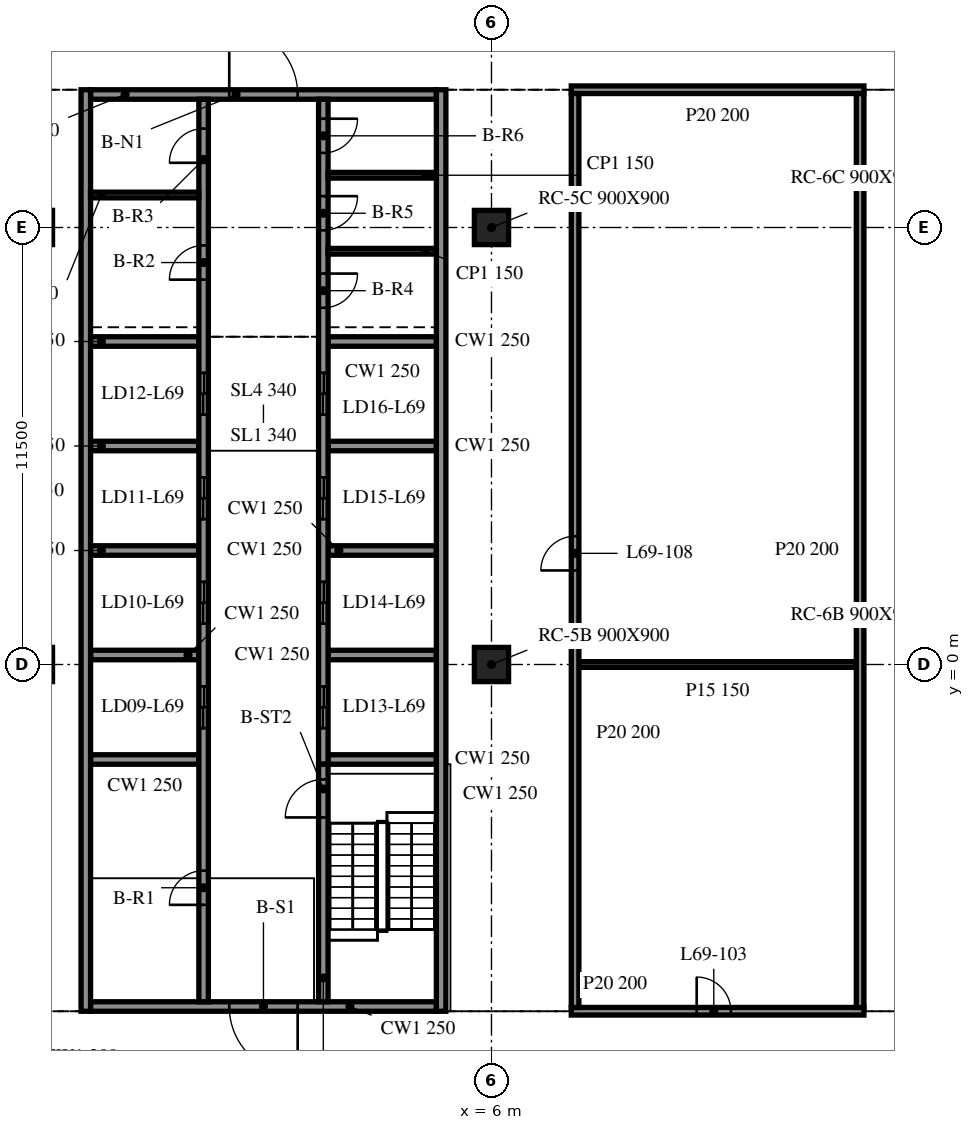
"""IFC4 building model, lengths in metres.
Left out: names, types, materials, properties, quantities, classifications, styles, units other than length and angle.
Written with IfcOpenShell. Run it as: python <this file> out.ifc"""

import sys

from ifc_helpers import new_model, si_unit, direction, frame, frame_2d, origin, origin_2d, place, context, subcontext, project, spatial, rectangle, extrude, element, fill, save


model = new_model("IFC4")
c1 = context("Model", 3, precision=1e-05, world=origin(), true_north=direction((0.0, 1.0)))
c2 = subcontext(c1, "Body", "Model", "MODEL_VIEW")
j1 = project(units=[si_unit("LENGTHUNIT", "METRE"), si_unit("PLANEANGLEUNIT", "RADIAN")], contexts=[c1])
p1 = place(None, origin())
s1 = spatial("IfcSite", under=j1, at=p1, CompositionType="ELEMENT")
p2 = place(p1, origin())
s2 = spatial("IfcBuilding", under=s1, at=p2, CompositionType="ELEMENT")
p3 = place(p2, frame((0.0, 0.0, 282.3)))
s3 = spatial("IfcBuildingStorey", under=s2, at=p3, CompositionType="ELEMENT", Elevation=282.3)
for number, where, z_axis, x_axis in (
    (1, (6.0, 0.0, -0.34), (0.0, 0.0, 1.0), (1.0, 0.0, 0.0)),
    (2, (6.0, 11.5, -0.34), (0.0, 0.0, 1.0), (1.0, 0.0, 0.0)),
):
    element("IfcColumn", number, at=place(p3, frame(where, z_axis=z_axis, x_axis=x_axis)), inside=s3, PredefinedType="COLUMN", context=c2, shape_type="SweptSolid", body=[
        extrude(rectangle(XDim=0.9, YDim=0.9, at=origin_2d()), origin(), (0.0, 0.0, 1.0), 7.34),
    ])
for number, where, z_axis, x_axis in (
    (3, (-4.675, 15.125, 0.0), (0.0, 0.0, 1.0), (0.0, -1.0, 0.0)),
    (4, (4.675, -9.125, 0.0), (0.0, 0.0, 1.0), (0.0, 1.0, 0.0)),
):
    element("IfcWall", number, at=place(p3, frame(where, z_axis=z_axis, x_axis=x_axis)), inside=s3, PredefinedType="SOLIDWALL", context=c2, shape_type="SweptSolid", body=[
        extrude(rectangle(XDim=24.25, YDim=0.25, at=frame_2d((12.125, 0.0))), origin(), (0.0, 0.0, 1.0), 3.46),
    ])
p4 = place(p3, frame((4.55, -9.0, 0.0), z_axis=(0.0, 0.0, 1.0), x_axis=(-1.0, 0.0, 0.0)))
e5 = element("IfcWall", 5, at=p4, inside=s3, PredefinedType="SOLIDWALL", context=c2, shape_type="SweptSolid", body=[
    extrude(rectangle(XDim=9.1, YDim=0.25, at=frame_2d((4.55, 0.0))), origin(), (0.0, 0.0, 1.0), 3.46),
])
p5 = place(p4, frame((3.65, 0.0, 0.0)))
e6 = element("IfcOpeningElement", 6, at=p5, cuts=e5, PredefinedType="OPENING", context=c2, shape_type="SweptSolid", body=[
    extrude(rectangle(XDim=1.8, YDim=2.1, at=frame_2d((0.9, 1.05))), frame((0.0, 0.135, 0.0), z_axis=(0.0, -1.0, 0.0), x_axis=(1.0, 0.0, 0.0)), (0.0, 0.0, 1.0), 0.27),
])
p6 = place(p3, frame((-4.55, 15.0, 0.0), z_axis=(0.0, 0.0, 1.0), x_axis=(1.0, 0.0, 0.0)))
e7 = element("IfcWall", 7, at=p6, inside=s3, PredefinedType="SOLIDWALL", context=c2, shape_type="SweptSolid", body=[
    extrude(rectangle(XDim=9.1, YDim=0.25, at=frame_2d((4.55, 0.0))), origin(), (0.0, 0.0, 1.0), 3.46),
])
p7 = place(p6, frame((3.65, 0.0, 0.0)))
e8 = element("IfcOpeningElement", 8, at=p7, cuts=e7, PredefinedType="OPENING", context=c2, shape_type="SweptSolid", body=[
    extrude(rectangle(XDim=1.8, YDim=2.1, at=frame_2d((0.9, 1.05))), frame((0.0, 0.135, 0.0), z_axis=(0.0, -1.0, 0.0), x_axis=(1.0, 0.0, 0.0)), (0.0, 0.0, 1.0), 0.27),
])
p8 = place(p3, frame((-1.575, -8.875, 0.0), z_axis=(0.0, 0.0, 1.0), x_axis=(0.0, 1.0, 0.0)))
e9 = element("IfcWall", 9, at=p8, inside=s3, PredefinedType="SOLIDWALL", context=c2, shape_type="SweptSolid", body=[
    extrude(rectangle(XDim=23.75, YDim=0.25, at=frame_2d((11.875, 0.0))), origin(), (0.0, 0.0, 1.0), 3.46),
])
p9 = place(p8, frame((7.2, 0.0, 0.0)))
e10 = element("IfcOpeningElement", 10, at=p9, cuts=e9, PredefinedType="OPENING", context=c2, shape_type="SweptSolid", body=[
    extrude(rectangle(XDim=1.1, YDim=2.1, at=frame_2d((0.55, 1.05))), frame((0.0, 0.135, 0.0), z_axis=(0.0, -1.0, 0.0), x_axis=(1.0, 0.0, 0.0)), (0.0, 0.0, 1.0), 0.27),
])
p10 = place(p8, frame((9.95, 0.0, 0.0)))
e11 = element("IfcOpeningElement", 11, at=p10, cuts=e9, PredefinedType="OPENING", context=c2, shape_type="SweptSolid", body=[
    extrude(rectangle(XDim=1.1, YDim=2.1, at=frame_2d((0.55, 1.05))), frame((0.0, 0.135, 0.0), z_axis=(0.0, -1.0, 0.0), x_axis=(1.0, 0.0, 0.0)), (0.0, 0.0, 1.0), 0.27),
])
p11 = place(p8, frame((12.7, 0.0, 0.0)))
e12 = element("IfcOpeningElement", 12, at=p11, cuts=e9, PredefinedType="OPENING", context=c2, shape_type="SweptSolid", body=[
    extrude(rectangle(XDim=1.1, YDim=2.1, at=frame_2d((0.55, 1.05))), frame((0.0, 0.135, 0.0), z_axis=(0.0, -1.0, 0.0), x_axis=(1.0, 0.0, 0.0)), (0.0, 0.0, 1.0), 0.27),
])
p12 = place(p8, frame((15.45, 0.0, 0.0)))
e13 = element("IfcOpeningElement", 13, at=p12, cuts=e9, PredefinedType="OPENING", context=c2, shape_type="SweptSolid", body=[
    extrude(rectangle(XDim=1.1, YDim=2.1, at=frame_2d((0.55, 1.05))), frame((0.0, 0.135, 0.0), z_axis=(0.0, -1.0, 0.0), x_axis=(1.0, 0.0, 0.0)), (0.0, 0.0, 1.0), 0.27),
])
p13 = place(p8, frame((2.55, 0.0, 0.0)))
e14 = element("IfcOpeningElement", 14, at=p13, cuts=e9, PredefinedType="OPENING", context=c2, shape_type="SweptSolid", body=[
    extrude(rectangle(XDim=0.9, YDim=2.1, at=frame_2d((0.45, 1.05))), frame((0.0, 0.135, 0.0), z_axis=(0.0, -1.0, 0.0), x_axis=(1.0, 0.0, 0.0)), (0.0, 0.0, 1.0), 0.27),
])
p14 = place(p8, frame((19.002, 0.0, 0.0)))
e15 = element("IfcOpeningElement", 15, at=p14, cuts=e9, PredefinedType="OPENING", context=c2, shape_type="SweptSolid", body=[
    extrude(rectangle(XDim=0.9, YDim=2.1, at=frame_2d((0.45, 1.05))), frame((0.0, 0.135, 0.0), z_axis=(0.0, -1.0, 0.0), x_axis=(1.0, 0.0, 0.0)), (0.0, 0.0, 1.0), 0.27),
])
p15 = place(p8, frame((22.077, 0.0, 0.0)))
e16 = element("IfcOpeningElement", 16, at=p15, cuts=e9, PredefinedType="OPENING", context=c2, shape_type="SweptSolid", body=[
    extrude(rectangle(XDim=0.9, YDim=2.1, at=frame_2d((0.45, 1.05))), frame((0.0, 0.135, 0.0), z_axis=(0.0, -1.0, 0.0), x_axis=(1.0, 0.0, 0.0)), (0.0, 0.0, 1.0), 0.27),
])
p16 = place(p3, frame((1.575, -8.875, 0.0), z_axis=(0.0, 0.0, 1.0), x_axis=(0.0, 1.0, 0.0)))
e17 = element("IfcWall", 17, at=p16, inside=s3, PredefinedType="SOLIDWALL", context=c2, shape_type="SweptSolid", body=[
    extrude(rectangle(XDim=6.25, YDim=0.25, at=frame_2d((3.125, 0.0))), origin(), (0.0, 0.0, 1.0), 3.46),
])
p17 = place(p16, frame((4.85, 0.0, 0.0)))
e18 = element("IfcOpeningElement", 18, at=p17, cuts=e17, PredefinedType="OPENING", context=c2, shape_type="SweptSolid", body=[
    extrude(rectangle(XDim=1.0, YDim=2.1, at=frame_2d((0.5, 1.05))), frame((0.0, 0.135, 0.0), z_axis=(0.0, -1.0, 0.0), x_axis=(1.0, 0.0, 0.0)), (0.0, 0.0, 1.0), 0.27),
])
p18 = place(p3, frame((1.575, 14.875, 0.0), z_axis=(0.0, 0.0, 1.0), x_axis=(0.0, -1.0, 0.0)))
e19 = element("IfcWall", 19, at=p18, inside=s3, PredefinedType="SOLIDWALL", context=c2, shape_type="SweptSolid", body=[
    extrude(rectangle(XDim=17.5, YDim=0.25, at=frame_2d((8.75, 0.0))), origin(), (0.0, 0.0, 1.0), 3.46),
])
p19 = place(p18, frame((15.45, 0.0, 0.0)))
e20 = element("IfcOpeningElement", 20, at=p19, cuts=e19, PredefinedType="OPENING", context=c2, shape_type="SweptSolid", body=[
    extrude(rectangle(XDim=1.1, YDim=2.1, at=frame_2d((0.55, 1.05))), frame((0.0, 0.135, 0.0), z_axis=(0.0, -1.0, 0.0), x_axis=(1.0, 0.0, 0.0)), (0.0, 0.0, 1.0), 0.27),
])
p20 = place(p18, frame((12.7, 0.0, 0.0)))
e21 = element("IfcOpeningElement", 21, at=p20, cuts=e19, PredefinedType="OPENING", context=c2, shape_type="SweptSolid", body=[
    extrude(rectangle(XDim=1.1, YDim=2.1, at=frame_2d((0.55, 1.05))), frame((0.0, 0.135, 0.0), z_axis=(0.0, -1.0, 0.0), x_axis=(1.0, 0.0, 0.0)), (0.0, 0.0, 1.0), 0.27),
])
p21 = place(p18, frame((9.95, 0.0, 0.0)))
e22 = element("IfcOpeningElement", 22, at=p21, cuts=e19, PredefinedType="OPENING", context=c2, shape_type="SweptSolid", body=[
    extrude(rectangle(XDim=1.1, YDim=2.1, at=frame_2d((0.55, 1.05))), frame((0.0, 0.135, 0.0), z_axis=(0.0, -1.0, 0.0), x_axis=(1.0, 0.0, 0.0)), (0.0, 0.0, 1.0), 0.27),
])
p22 = place(p18, frame((7.2, 0.0, 0.0)))
e23 = element("IfcOpeningElement", 23, at=p22, cuts=e19, PredefinedType="OPENING", context=c2, shape_type="SweptSolid", body=[
    extrude(rectangle(XDim=1.1, YDim=2.1, at=frame_2d((0.55, 1.05))), frame((0.0, 0.135, 0.0), z_axis=(0.0, -1.0, 0.0), x_axis=(1.0, 0.0, 0.0)), (0.0, 0.0, 1.0), 0.27),
])
p23 = place(p18, frame((4.587, 0.0, 0.0)))
e24 = element("IfcOpeningElement", 24, at=p23, cuts=e19, PredefinedType="OPENING", context=c2, shape_type="SweptSolid", body=[
    extrude(rectangle(XDim=0.9, YDim=2.1, at=frame_2d((0.45, 1.05))), frame((0.0, 0.135, 0.0), z_axis=(0.0, -1.0, 0.0), x_axis=(1.0, 0.0, 0.0)), (0.0, 0.0, 1.0), 0.27),
])
p24 = place(p18, frame((2.55, 0.0, 0.0)))
e25 = element("IfcOpeningElement", 25, at=p24, cuts=e19, PredefinedType="OPENING", context=c2, shape_type="SweptSolid", body=[
    extrude(rectangle(XDim=0.9, YDim=2.1, at=frame_2d((0.45, 1.05))), frame((0.0, 0.135, 0.0), z_axis=(0.0, -1.0, 0.0), x_axis=(1.0, 0.0, 0.0)), (0.0, 0.0, 1.0), 0.27),
])
p25 = place(p18, frame((0.512, 0.0, 0.0)))
e26 = element("IfcOpeningElement", 26, at=p25, cuts=e19, PredefinedType="OPENING", context=c2, shape_type="SweptSolid", body=[
    extrude(rectangle(XDim=0.9, YDim=2.1, at=frame_2d((0.45, 1.05))), frame((0.0, 0.135, 0.0), z_axis=(0.0, -1.0, 0.0), x_axis=(1.0, 0.0, 0.0)), (0.0, 0.0, 1.0), 0.27),
])
for number, where, z_axis, x_axis in (
    (27, (-4.55, -2.5, 0.0), (0.0, 0.0, 1.0), (1.0, 0.0, 0.0)),
    (28, (-4.55, 0.25, 0.0), (0.0, 0.0, 1.0), (1.0, 0.0, 0.0)),
    (29, (-4.55, 3.0, 0.0), (0.0, 0.0, 1.0), (1.0, 0.0, 0.0)),
    (30, (-4.55, 5.75, 0.0), (0.0, 0.0, 1.0), (1.0, 0.0, 0.0)),
    (31, (-4.55, 8.5, 0.0), (0.0, 0.0, 1.0), (1.0, 0.0, 0.0)),
    (32, (1.7, -2.5, 0.0), (0.0, 0.0, 1.0), (1.0, 0.0, 0.0)),
    (33, (1.7, 0.25, 0.0), (0.0, 0.0, 1.0), (1.0, 0.0, 0.0)),
    (34, (1.7, 3.0, 0.0), (0.0, 0.0, 1.0), (1.0, 0.0, 0.0)),
    (35, (1.7, 5.75, 0.0), (0.0, 0.0, 1.0), (1.0, 0.0, 0.0)),
    (36, (1.7, 8.5, 0.0), (0.0, 0.0, 1.0), (1.0, 0.0, 0.0)),
):
    element("IfcWall", number, at=place(p3, frame(where, z_axis=z_axis, x_axis=x_axis)), inside=s3, PredefinedType="SOLIDWALL", context=c2, shape_type="SweptSolid", body=[
        extrude(rectangle(XDim=2.85, YDim=0.25, at=frame_2d((1.425, 0.0))), origin(), (0.0, 0.0, 1.0), 3.46),
    ])
for number, where, z_axis, x_axis in (
    (37, (-4.55, 12.355, 0.0), (0.0, 0.0, 1.0), (1.0, 0.0, 0.0)),
    (38, (1.7, 10.875, 0.0), (0.0, 0.0, 1.0), (1.0, 0.0, 0.0)),
    (39, (1.7, 12.875, 0.0), (0.0, 0.0, 1.0), (1.0, 0.0, 0.0)),
):
    element("IfcWall", number, at=place(p3, frame(where, z_axis=z_axis, x_axis=x_axis)), inside=s3, PredefinedType="PARTITIONING", context=c2, shape_type="SweptSolid", body=[
        extrude(rectangle(XDim=2.85, YDim=0.15, at=frame_2d((1.425, 0.0))), origin(), (0.0, 0.0, 1.0), 3.46),
    ])
p26 = place(p3, frame((8.1, -9.125, 0.0), z_axis=(0.0, 0.0, 1.0), x_axis=(1.0, 0.0, 0.0)))
e40 = element("IfcWall", 40, at=p26, inside=s3, PredefinedType="PARTITIONING", context=c2, shape_type="SweptSolid", body=[
    extrude(rectangle(XDim=7.7, YDim=0.2, at=frame_2d((3.85, 0.0))), origin(), (0.0, 0.0, 1.0), 3.4),
])
p27 = place(p26, frame((3.3, 0.0, 0.0)))
e41 = element("IfcOpeningElement", 41, at=p27, cuts=e40, PredefinedType="OPENING", context=c2, shape_type="SweptSolid", body=[
    extrude(rectangle(XDim=0.9, YDim=2.1, at=frame_2d((0.45, 1.05))), frame((0.0, 0.11, 0.0), z_axis=(0.0, -1.0, 0.0), x_axis=(1.0, 0.0, 0.0)), (0.0, 0.0, 1.0), 0.22),
])
p28 = place(p3, frame((8.3, 0.0, 0.0), z_axis=(0.0, 0.0, 1.0), x_axis=(1.0, 0.0, 0.0)))
e42 = element("IfcWall", 42, at=p28, inside=s3, PredefinedType="PARTITIONING", context=c2, shape_type="SweptSolid", body=[
    extrude(rectangle(XDim=7.3, YDim=0.15, at=frame_2d((3.65, 0.0))), origin(), (0.0, 0.0, 1.0), 3.4),
])
p29 = place(p3, frame((8.1, 15.125, 0.0), z_axis=(0.0, 0.0, 1.0), x_axis=(1.0, 0.0, 0.0)))
e43 = element("IfcWall", 43, at=p29, inside=s3, PredefinedType="PARTITIONING", context=c2, shape_type="SweptSolid", body=[
    extrude(rectangle(XDim=7.7, YDim=0.2, at=frame_2d((3.85, 0.0))), origin(), (0.0, 0.0, 1.0), 3.4),
])
p30 = place(p3, frame((8.2, -9.025, 0.0), z_axis=(0.0, 0.0, 1.0), x_axis=(0.0, 1.0, 0.0)))
e44 = element("IfcWall", 44, at=p30, inside=s3, PredefinedType="PARTITIONING", context=c2, shape_type="SweptSolid", body=[
    extrude(rectangle(XDim=24.05, YDim=0.2, at=frame_2d((12.025, 0.0))), origin(), (0.0, 0.0, 1.0), 3.4),
])
p31 = place(p30, frame((11.5, 0.0, 0.0)))
e45 = element("IfcOpeningElement", 45, at=p31, cuts=e44, PredefinedType="OPENING", context=c2, shape_type="SweptSolid", body=[
    extrude(rectangle(XDim=0.9, YDim=2.1, at=frame_2d((0.45, 1.05))), frame((0.0, 0.11, 0.0), z_axis=(0.0, -1.0, 0.0), x_axis=(1.0, 0.0, 0.0)), (0.0, 0.0, 1.0), 0.22),
])
p32 = place(p3, frame((15.7, -9.025, 0.0), z_axis=(0.0, 0.0, 1.0), x_axis=(0.0, 1.0, 0.0)))
e46 = element("IfcWall", 46, at=p32, inside=s3, PredefinedType="PARTITIONING", context=c2, shape_type="SweptSolid", body=[
    extrude(rectangle(XDim=24.05, YDim=0.2, at=frame_2d((12.025, 0.0))), origin(), (0.0, 0.0, 1.0), 3.4),
])
p33 = place(p5, origin())
e47 = element("IfcDoor", 47, at=p33, inside=s3, OperationType="DOUBLE_DOOR_SINGLE_SWING", PredefinedType="DOOR", context=c2, shape_type="SweptSolid", body=[
    extrude(rectangle(XDim=1.8, YDim=2.1, at=frame_2d((0.9, 1.05))), frame((0.0, 0.025, 0.0), z_axis=(0.0, -1.0, 0.0), x_axis=(1.0, 0.0, 0.0)), (0.0, 0.0, 1.0), 0.05),
])
fill(e6, e47)
p34 = place(p7, origin())
e48 = element("IfcDoor", 48, at=p34, inside=s3, OperationType="DOUBLE_DOOR_SINGLE_SWING", PredefinedType="DOOR", context=c2, shape_type="SweptSolid", body=[
    extrude(rectangle(XDim=1.8, YDim=2.1, at=frame_2d((0.9, 1.05))), frame((0.0, 0.025, 0.0), z_axis=(0.0, -1.0, 0.0), x_axis=(1.0, 0.0, 0.0)), (0.0, 0.0, 1.0), 0.05),
])
fill(e8, e48)
p35 = place(p19, origin())
e49 = element("IfcDoor", 49, at=p35, inside=s3, OperationType="DOUBLE_DOOR_SLIDING", PredefinedType="DOOR", context=c2, shape_type="SweptSolid", body=[
    extrude(rectangle(XDim=1.1, YDim=2.1, at=frame_2d((0.55, 1.05))), frame((0.0, 0.025, 0.0), z_axis=(0.0, -1.0, 0.0), x_axis=(1.0, 0.0, 0.0)), (0.0, 0.0, 1.0), 0.05),
])
fill(e20, e49)
p36 = place(p20, origin())
e50 = element("IfcDoor", 50, at=p36, inside=s3, OperationType="DOUBLE_DOOR_SLIDING", PredefinedType="DOOR", context=c2, shape_type="SweptSolid", body=[
    extrude(rectangle(XDim=1.1, YDim=2.1, at=frame_2d((0.55, 1.05))), frame((0.0, 0.025, 0.0), z_axis=(0.0, -1.0, 0.0), x_axis=(1.0, 0.0, 0.0)), (0.0, 0.0, 1.0), 0.05),
])
fill(e21, e50)
p37 = place(p21, origin())
e51 = element("IfcDoor", 51, at=p37, inside=s3, OperationType="DOUBLE_DOOR_SLIDING", PredefinedType="DOOR", context=c2, shape_type="SweptSolid", body=[
    extrude(rectangle(XDim=1.1, YDim=2.1, at=frame_2d((0.55, 1.05))), frame((0.0, 0.025, 0.0), z_axis=(0.0, -1.0, 0.0), x_axis=(1.0, 0.0, 0.0)), (0.0, 0.0, 1.0), 0.05),
])
fill(e22, e51)
p38 = place(p22, origin())
e52 = element("IfcDoor", 52, at=p38, inside=s3, OperationType="DOUBLE_DOOR_SLIDING", PredefinedType="DOOR", context=c2, shape_type="SweptSolid", body=[
    extrude(rectangle(XDim=1.1, YDim=2.1, at=frame_2d((0.55, 1.05))), frame((0.0, 0.025, 0.0), z_axis=(0.0, -1.0, 0.0), x_axis=(1.0, 0.0, 0.0)), (0.0, 0.0, 1.0), 0.05),
])
fill(e23, e52)
p39 = place(p9, origin())
e53 = element("IfcDoor", 53, at=p39, inside=s3, OperationType="DOUBLE_DOOR_SLIDING", PredefinedType="DOOR", context=c2, shape_type="SweptSolid", body=[
    extrude(rectangle(XDim=1.1, YDim=2.1, at=frame_2d((0.55, 1.05))), frame((0.0, 0.025, 0.0), z_axis=(0.0, -1.0, 0.0), x_axis=(1.0, 0.0, 0.0)), (0.0, 0.0, 1.0), 0.05),
])
fill(e10, e53)
p40 = place(p10, origin())
e54 = element("IfcDoor", 54, at=p40, inside=s3, OperationType="DOUBLE_DOOR_SLIDING", PredefinedType="DOOR", context=c2, shape_type="SweptSolid", body=[
    extrude(rectangle(XDim=1.1, YDim=2.1, at=frame_2d((0.55, 1.05))), frame((0.0, 0.025, 0.0), z_axis=(0.0, -1.0, 0.0), x_axis=(1.0, 0.0, 0.0)), (0.0, 0.0, 1.0), 0.05),
])
fill(e11, e54)
p41 = place(p11, origin())
e55 = element("IfcDoor", 55, at=p41, inside=s3, OperationType="DOUBLE_DOOR_SLIDING", PredefinedType="DOOR", context=c2, shape_type="SweptSolid", body=[
    extrude(rectangle(XDim=1.1, YDim=2.1, at=frame_2d((0.55, 1.05))), frame((0.0, 0.025, 0.0), z_axis=(0.0, -1.0, 0.0), x_axis=(1.0, 0.0, 0.0)), (0.0, 0.0, 1.0), 0.05),
])
fill(e12, e55)
p42 = place(p12, origin())
e56 = element("IfcDoor", 56, at=p42, inside=s3, OperationType="DOUBLE_DOOR_SLIDING", PredefinedType="DOOR", context=c2, shape_type="SweptSolid", body=[
    extrude(rectangle(XDim=1.1, YDim=2.1, at=frame_2d((0.55, 1.05))), frame((0.0, 0.025, 0.0), z_axis=(0.0, -1.0, 0.0), x_axis=(1.0, 0.0, 0.0)), (0.0, 0.0, 1.0), 0.05),
])
fill(e13, e56)
p43 = place(p13, origin())
e57 = element("IfcDoor", 57, at=p43, inside=s3, OperationType="SINGLE_SWING_LEFT", PredefinedType="DOOR", context=c2, shape_type="SweptSolid", body=[
    extrude(rectangle(XDim=0.9, YDim=2.1, at=frame_2d((0.45, 1.05))), frame((0.0, 0.025, 0.0), z_axis=(0.0, -1.0, 0.0), x_axis=(1.0, 0.0, 0.0)), (0.0, 0.0, 1.0), 0.05),
])
fill(e14, e57)
p44 = place(p14, origin())
e58 = element("IfcDoor", 58, at=p44, inside=s3, OperationType="SINGLE_SWING_RIGHT", PredefinedType="DOOR", context=c2, shape_type="SweptSolid", body=[
    extrude(rectangle(XDim=0.9, YDim=2.1, at=frame_2d((0.45, 1.05))), frame((0.0, 0.025, 0.0), z_axis=(0.0, -1.0, 0.0), x_axis=(1.0, 0.0, 0.0)), (0.0, 0.0, 1.0), 0.05),
])
fill(e15, e58)
p45 = place(p15, origin())
e59 = element("IfcDoor", 59, at=p45, inside=s3, OperationType="SINGLE_SWING_LEFT", PredefinedType="DOOR", context=c2, shape_type="SweptSolid", body=[
    extrude(rectangle(XDim=0.9, YDim=2.1, at=frame_2d((0.45, 1.05))), frame((0.0, 0.025, 0.0), z_axis=(0.0, -1.0, 0.0), x_axis=(1.0, 0.0, 0.0)), (0.0, 0.0, 1.0), 0.05),
])
fill(e16, e59)
p46 = place(p23, origin())
e60 = element("IfcDoor", 60, at=p46, inside=s3, OperationType="SINGLE_SWING_RIGHT", PredefinedType="DOOR", context=c2, shape_type="SweptSolid", body=[
    extrude(rectangle(XDim=0.9, YDim=2.1, at=frame_2d((0.45, 1.05))), frame((0.0, 0.025, 0.0), z_axis=(0.0, -1.0, 0.0), x_axis=(1.0, 0.0, 0.0)), (0.0, 0.0, 1.0), 0.05),
])
fill(e24, e60)
p47 = place(p24, origin())
e61 = element("IfcDoor", 61, at=p47, inside=s3, OperationType="SINGLE_SWING_LEFT", PredefinedType="DOOR", context=c2, shape_type="SweptSolid", body=[
    extrude(rectangle(XDim=0.9, YDim=2.1, at=frame_2d((0.45, 1.05))), frame((0.0, 0.025, 0.0), z_axis=(0.0, -1.0, 0.0), x_axis=(1.0, 0.0, 0.0)), (0.0, 0.0, 1.0), 0.05),
])
fill(e25, e61)
p48 = place(p25, origin())
e62 = element("IfcDoor", 62, at=p48, inside=s3, OperationType="SINGLE_SWING_RIGHT", PredefinedType="DOOR", context=c2, shape_type="SweptSolid", body=[
    extrude(rectangle(XDim=0.9, YDim=2.1, at=frame_2d((0.45, 1.05))), frame((0.0, 0.025, 0.0), z_axis=(0.0, -1.0, 0.0), x_axis=(1.0, 0.0, 0.0)), (0.0, 0.0, 1.0), 0.05),
])
fill(e26, e62)
p49 = place(p17, origin())
e63 = element("IfcDoor", 63, at=p49, inside=s3, OperationType="SINGLE_SWING_LEFT", PredefinedType="DOOR", context=c2, shape_type="SweptSolid", body=[
    extrude(rectangle(XDim=1.0, YDim=2.1, at=frame_2d((0.5, 1.05))), frame((0.0, 0.025, 0.0), z_axis=(0.0, -1.0, 0.0), x_axis=(1.0, 0.0, 0.0)), (0.0, 0.0, 1.0), 0.05),
])
fill(e18, e63)
p50 = place(p27, origin())
e64 = element("IfcDoor", 64, at=p50, inside=s3, OperationType="SINGLE_SWING_LEFT", PredefinedType="DOOR", context=c2, shape_type="SweptSolid", body=[
    extrude(rectangle(XDim=0.9, YDim=2.1, at=frame_2d((0.45, 1.05))), frame((0.0, 0.025, 0.0), z_axis=(0.0, -1.0, 0.0), x_axis=(1.0, 0.0, 0.0)), (0.0, 0.0, 1.0), 0.05),
])
fill(e41, e64)
p51 = place(p31, origin())
e65 = element("IfcDoor", 65, at=p51, inside=s3, OperationType="SINGLE_SWING_RIGHT", PredefinedType="DOOR", context=c2, shape_type="SweptSolid", body=[
    extrude(rectangle(XDim=0.9, YDim=2.1, at=frame_2d((0.45, 1.05))), frame((0.0, 0.025, 0.0), z_axis=(0.0, -1.0, 0.0), x_axis=(1.0, 0.0, 0.0)), (0.0, 0.0, 1.0), 0.05),
])
fill(e45, e65)
save(model, sys.argv[1])
